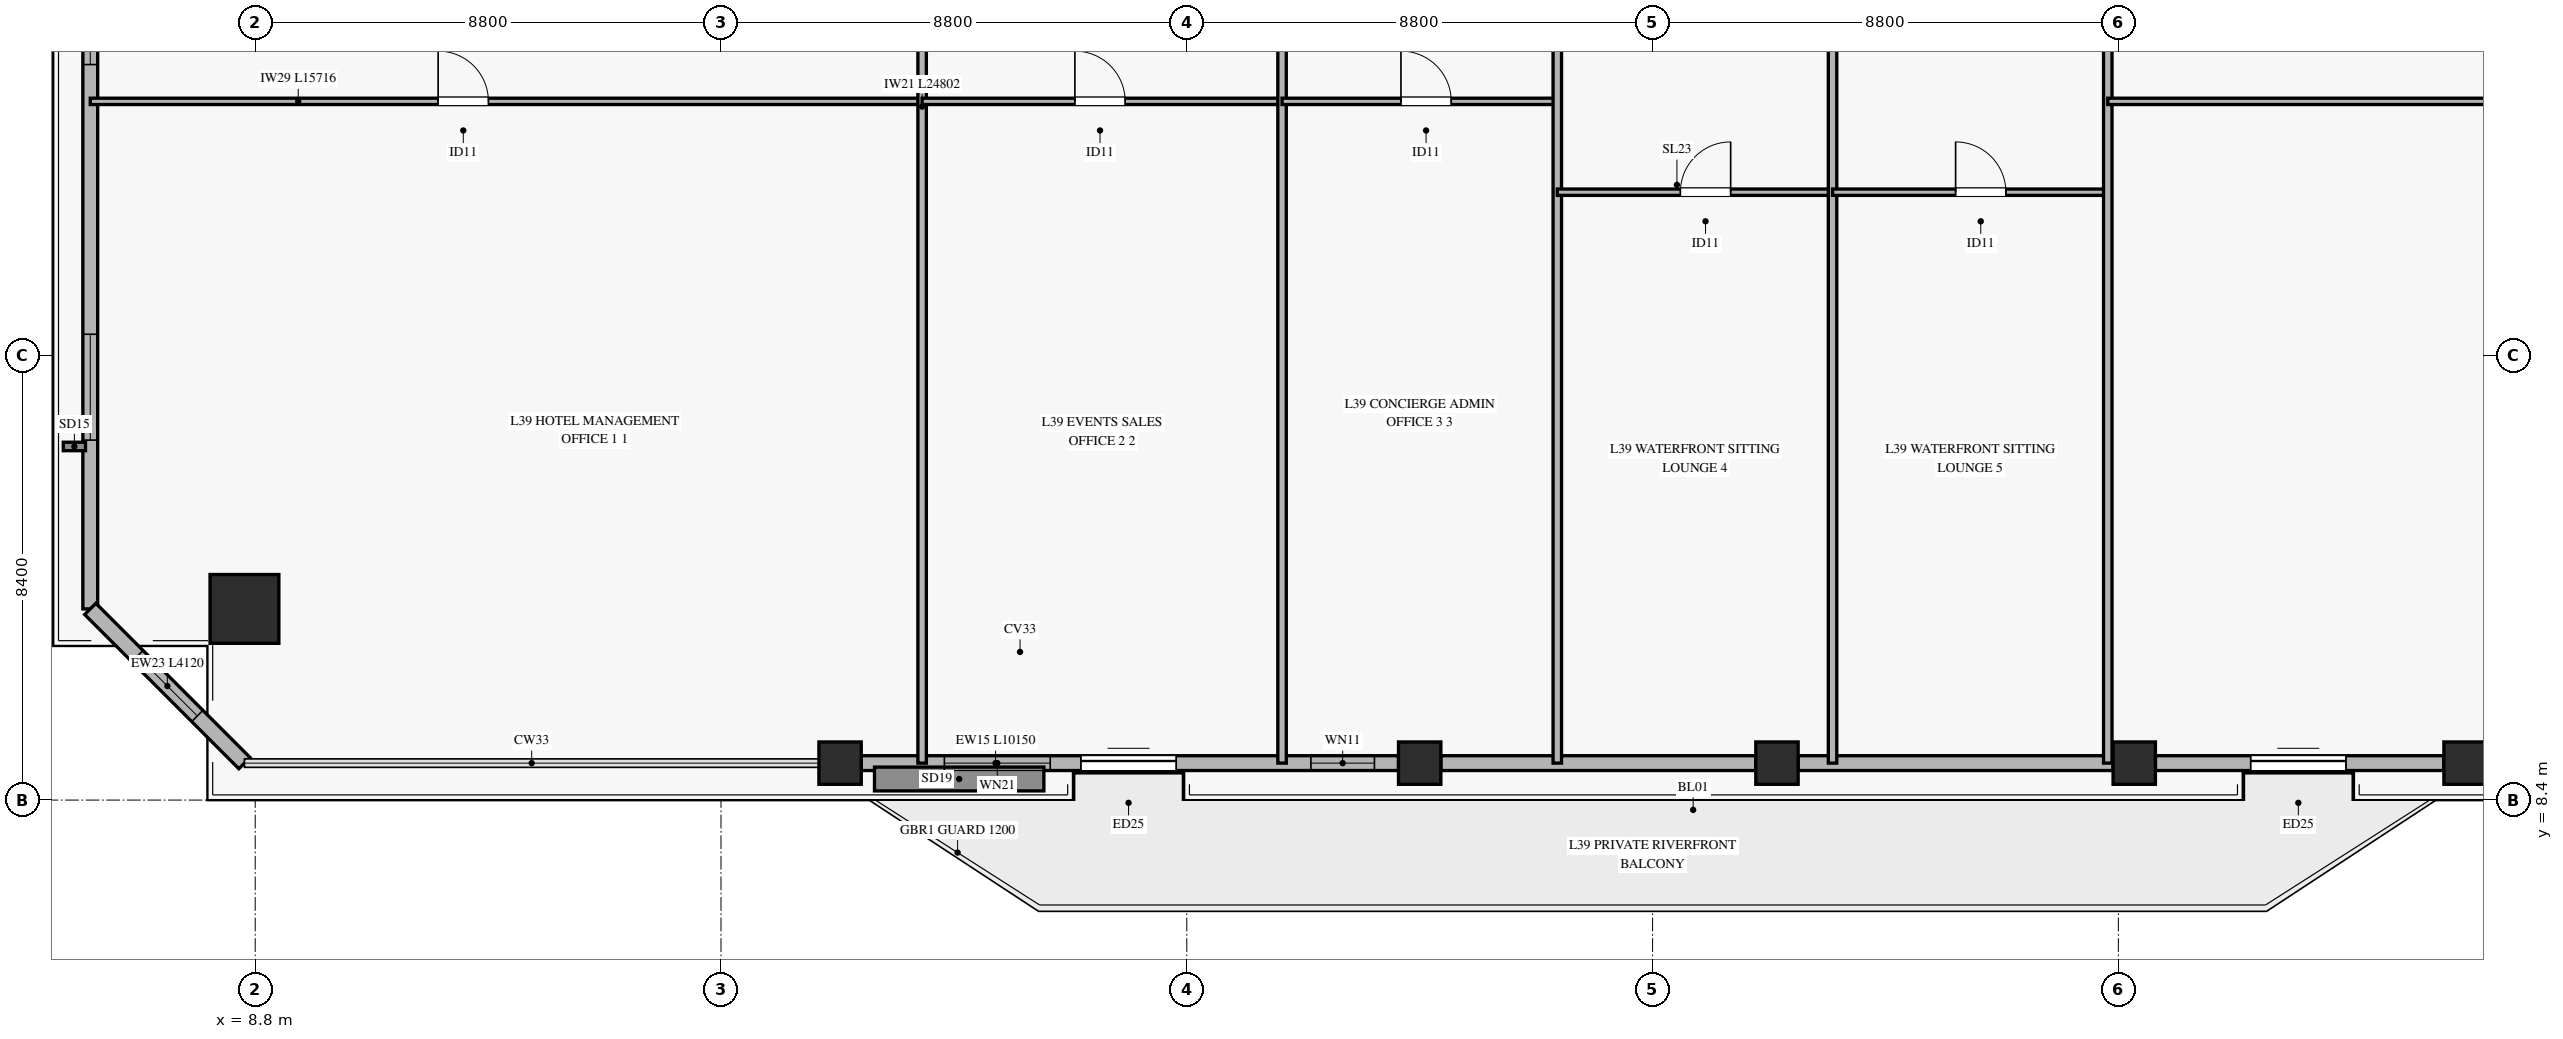
"""IFC4 building model, lengths in metres.
Left out: names, types, materials, properties, quantities, classifications, styles, units other than length and angle.
Written with IfcOpenShell. Run it as: python <this file> out.ifc"""

import sys

from ifc_helpers import new_model, si_unit, direction, frame, frame_2d, origin, origin_2d, place, context, subcontext, project, spatial, rectangle, hollow_rectangle, extrude, source, transform, mapped, element, fill, save


model = new_model("IFC4")
c1 = context("Model", 3, precision=1e-05, world=origin(), true_north=direction((0.0, 1.0)))
c2 = subcontext(c1, "Body", "Model", "MODEL_VIEW")
j1 = project(units=[si_unit("LENGTHUNIT", "METRE"), si_unit("PLANEANGLEUNIT", "RADIAN")], contexts=[c1])
p1 = place(None, origin())
s1 = spatial("IfcSite", under=j1, at=p1, CompositionType="ELEMENT")
p2 = place(p1, origin())
s2 = spatial("IfcBuilding", under=s1, at=p2, CompositionType="ELEMENT")
p3 = place(p2, frame((0.0, 0.0, 159.7)))
s3 = spatial("IfcBuildingStorey", under=s2, at=p3, CompositionType="ELEMENT", Elevation=159.7)
m1 = source(origin(), c2, "Body", "SweptSolid", [
    extrude(hollow_rectangle(XDim=1.3, YDim=1.3, WallThickness=0.06, at=origin_2d()), origin(), (0.0, 0.0, 1.0), 3.27),
])
p4 = place(p3, frame((8.597, 12.011, 0.0), z_axis=(0.0, 0.0, 1.0), x_axis=(1.0, 0.0, 0.0)))
e1 = element("IfcColumn", 1, at=p4, inside=s3, PredefinedType="COLUMN", context=c2, shape_type="MappedRepresentation", body=[
    mapped(m1, transform((0.0, 0.0, 0.0), x_axis=(1.0, 0.0, 0.0), y_axis=(0.0, 1.0, 0.0), z_axis=(0.0, 0.0, 1.0), scale=1.0)),
])
m2 = source(origin(), c2, "Body", "SweptSolid", [
    extrude(hollow_rectangle(XDim=0.8, YDim=0.8, WallThickness=0.036, at=origin_2d()), origin(), (0.0, 0.0, 1.0), 3.27),
])
for number, where, z_axis, x_axis in (
    (2, (19.85, 9.098, 0.0), (0.0, 0.0, 1.0), (1.0, 0.0, 0.0)),
    (3, (30.8, 9.098, 0.0), (0.0, 0.0, 1.0), (1.0, 0.0, 0.0)),
    (4, (37.55, 9.098, 0.0), (0.0, 0.0, 1.0), (1.0, 0.0, 0.0)),
    (5, (44.3, 9.098, 0.0), (0.0, 0.0, 1.0), (1.0, 0.0, 0.0)),
    (6, (50.55, 9.098, 0.0), (0.0, 0.0, 1.0), (1.0, 0.0, 0.0)),
):
    element("IfcColumn", number, at=place(p3, frame(where, z_axis=z_axis, x_axis=x_axis)), inside=s3, PredefinedType="COLUMN", context=c2, shape_type="MappedRepresentation", body=[
        mapped(m2, transform((0.0, 0.0, 0.0), x_axis=(1.0, 0.0, 0.0), y_axis=(0.0, 1.0, 0.0), z_axis=(0.0, 0.0, 1.0), scale=1.0)),
    ])
p5 = place(p3, frame((20.25, 9.098, 0.0), z_axis=(0.0, 0.0, 1.0), x_axis=(1.0, 0.0, 0.0)))
e7 = element("IfcWall", 7, at=p5, inside=s3, PredefinedType="SOLIDWALL", context=c2, shape_type="SweptSolid", body=[
    extrude(rectangle(XDim=10.15, YDim=0.28, at=frame_2d((5.075, 0.0))), origin(), (0.0, 0.0, 1.0), 2.75),
])
p6 = place(p5, frame((4.15, 0.0, 0.0)))
e8 = element("IfcOpeningElement", 8, at=p6, cuts=e7, PredefinedType="OPENING", context=c2, shape_type="SweptSolid", body=[
    extrude(rectangle(XDim=1.8, YDim=2.25, at=frame_2d((0.9, 1.125))), frame((0.0, 0.15, 0.0), z_axis=(0.0, -1.0, 0.0), x_axis=(1.0, 0.0, 0.0)), (0.0, 0.0, 1.0), 0.3),
])
p7 = place(p5, frame((1.57, 0.0, 0.45)))
e9 = element("IfcOpeningElement", 9, at=p7, cuts=e7, PredefinedType="OPENING", context=c2, shape_type="SweptSolid", body=[
    extrude(rectangle(XDim=2.0, YDim=2.0, at=frame_2d((1.0, 1.0))), frame((0.0, 0.15, 0.0), z_axis=(0.0, -1.0, 0.0), x_axis=(1.0, 0.0, 0.0)), (0.0, 0.0, 1.0), 0.3),
])
p8 = place(p5, frame((8.495, 0.0, 0.45)))
e10 = element("IfcOpeningElement", 10, at=p8, cuts=e7, PredefinedType="OPENING", context=c2, shape_type="SweptSolid", body=[
    extrude(rectangle(XDim=1.2, YDim=2.0, at=frame_2d((0.6, 1.0))), frame((0.0, 0.15, 0.0), z_axis=(0.0, -1.0, 0.0), x_axis=(1.0, 0.0, 0.0)), (0.0, 0.0, 1.0), 0.3),
])
for number, where, z_axis, x_axis in (
    (11, (31.2, 9.098, 0.0), (0.0, 0.0, 1.0), (1.0, 0.0, 0.0)),
    (12, (37.95, 9.098, 0.0), (0.0, 0.0, 1.0), (1.0, 0.0, 0.0)),
):
    element("IfcWall", number, at=place(p3, frame(where, z_axis=z_axis, x_axis=x_axis)), inside=s3, PredefinedType="SOLIDWALL", context=c2, shape_type="SweptSolid", body=[
        extrude(rectangle(XDim=5.95, YDim=0.28, at=frame_2d((2.975, 0.0))), origin(), (0.0, 0.0, 1.0), 2.75),
    ])
p9 = place(p3, frame((44.7, 9.098, 0.0), z_axis=(0.0, 0.0, 1.0), x_axis=(1.0, 0.0, 0.0)))
e13 = element("IfcWall", 13, at=p9, inside=s3, PredefinedType="SOLIDWALL", context=c2, shape_type="SweptSolid", body=[
    extrude(rectangle(XDim=5.45, YDim=0.28, at=frame_2d((2.725, 0.0))), origin(), (0.0, 0.0, 1.0), 2.75),
])
p10 = place(p9, frame((1.8, 0.0, 0.0)))
e14 = element("IfcOpeningElement", 14, at=p10, cuts=e13, PredefinedType="OPENING", context=c2, shape_type="SweptSolid", body=[
    extrude(rectangle(XDim=1.8, YDim=2.25, at=frame_2d((0.9, 1.125))), frame((0.0, 0.15, 0.0), z_axis=(0.0, -1.0, 0.0), x_axis=(1.0, 0.0, 0.0)), (0.0, 0.0, 1.0), 0.3),
])
p11 = place(p3, frame((5.684, 12.011, 0.0), z_axis=(0.0, 0.0, 1.0), x_axis=(0.0, 1.0, 0.0)))
e15 = element("IfcWall", 15, at=p11, inside=s3, PredefinedType="SOLIDWALL", context=c2, shape_type="SweptSolid", body=[
    extrude(rectangle(XDim=15.188, YDim=0.28, at=frame_2d((7.594, 0.0))), origin(), (0.0, 0.0, 1.0), 2.75),
])
p12 = place(p11, frame((3.189, 0.0, 0.45)))
e16 = element("IfcOpeningElement", 16, at=p12, cuts=e15, PredefinedType="OPENING", context=c2, shape_type="SweptSolid", body=[
    extrude(rectangle(XDim=2.0, YDim=2.0, at=frame_2d((1.0, 1.0))), frame((0.0, 0.15, 0.0), z_axis=(0.0, -1.0, 0.0), x_axis=(1.0, 0.0, 0.0)), (0.0, 0.0, 1.0), 0.3),
])
p13 = place(p11, frame((10.283, 0.0, 0.45)))
e17 = element("IfcOpeningElement", 17, at=p13, cuts=e15, PredefinedType="OPENING", context=c2, shape_type="SweptSolid", body=[
    extrude(rectangle(XDim=2.0, YDim=2.0, at=frame_2d((1.0, 1.0))), frame((0.0, 0.15, 0.0), z_axis=(0.0, -1.0, 0.0), x_axis=(1.0, 0.0, 0.0)), (0.0, 0.0, 1.0), 0.3),
])
p14 = place(p3, frame((5.684, 12.011, 0.0), z_axis=(0.0, 0.0, 1.0), x_axis=(0.707077148634, -0.707136412497, 0.0)))
e18 = element("IfcWall", 18, at=p14, inside=s3, PredefinedType="SOLIDWALL", context=c2, shape_type="SweptSolid", body=[
    extrude(rectangle(XDim=4.12, YDim=0.3, at=frame_2d((2.06, 0.0))), origin(), (0.0, 0.0, 1.0), 2.75),
])
p15 = place(p14, frame((1.26, 0.0, 0.45)))
e19 = element("IfcOpeningElement", 19, at=p15, cuts=e18, PredefinedType="OPENING", context=c2, shape_type="SweptSolid", body=[
    extrude(rectangle(XDim=1.6, YDim=2.0, at=frame_2d((0.8, 1.0))), frame((0.0, 0.16, 0.0), z_axis=(0.0, -1.0, 0.0), x_axis=(1.0, 0.0, 0.0)), (0.0, 0.0, 1.0), 0.32),
])
p16 = place(p3, frame((5.684, 21.599, 0.0), z_axis=(0.0, 0.0, 1.0), x_axis=(1.0, 0.0, 0.0)))
e20 = element("IfcWall", 20, at=p16, inside=s3, PredefinedType="PARTITIONING", context=c2, shape_type="SweptSolid", body=[
    extrude(rectangle(XDim=15.716, YDim=0.12, at=frame_2d((7.858, 0.0))), origin(), (0.0, 0.0, 1.0), 2.455),
])
p17 = place(p16, frame((6.572, 0.0, 0.0)))
e21 = element("IfcOpeningElement", 21, at=p17, cuts=e20, PredefinedType="OPENING", context=c2, shape_type="SweptSolid", body=[
    extrude(rectangle(XDim=0.95, YDim=2.1, at=frame_2d((0.475, 1.05))), frame((0.0, 0.07, 0.0), z_axis=(0.0, -1.0, 0.0), x_axis=(1.0, 0.0, 0.0)), (0.0, 0.0, 1.0), 0.14),
])
p18 = place(p3, frame((21.4, 9.098, 0.0), z_axis=(0.0, 0.0, 1.0), x_axis=(0.0, 1.0, 0.0)))
e22 = element("IfcWall", 22, at=p18, inside=s3, PredefinedType="PARTITIONING", context=c2, shape_type="SweptSolid", body=[
    extrude(rectangle(XDim=24.802, YDim=0.16, at=frame_2d((12.401, 0.0))), origin(), (0.0, 0.0, 1.0), 2.755),
])
p19 = place(p3, frame((21.4, 21.599, 0.0), z_axis=(0.0, 0.0, 1.0), x_axis=(1.0, 0.0, 0.0)))
e23 = element("IfcWall", 23, at=p19, inside=s3, PredefinedType="PARTITIONING", context=c2, shape_type="SweptSolid", body=[
    extrude(rectangle(XDim=6.8, YDim=0.12, at=frame_2d((3.4, 0.0))), origin(), (0.0, 0.0, 1.0), 3.27),
])
p20 = place(p19, frame((2.886, 0.0, 0.0)))
e24 = element("IfcOpeningElement", 24, at=p20, cuts=e23, PredefinedType="OPENING", context=c2, shape_type="SweptSolid", body=[
    extrude(rectangle(XDim=0.95, YDim=2.1, at=frame_2d((0.475, 1.05))), frame((0.0, 0.07, 0.0), z_axis=(0.0, -1.0, 0.0), x_axis=(1.0, 0.0, 0.0)), (0.0, 0.0, 1.0), 0.14),
])
p21 = place(p3, frame((28.2, 9.098, 0.0), z_axis=(0.0, 0.0, 1.0), x_axis=(0.0, 1.0, 0.0)))
e25 = element("IfcWall", 25, at=p21, inside=s3, PredefinedType="PARTITIONING", context=c2, shape_type="SweptSolid", body=[
    extrude(rectangle(XDim=24.802, YDim=0.16, at=frame_2d((12.401, 0.0))), origin(), (0.0, 0.0, 1.0), 2.755),
])
p22 = place(p3, frame((28.2, 21.599, 0.0), z_axis=(0.0, 0.0, 1.0), x_axis=(1.0, 0.0, 0.0)))
e26 = element("IfcWall", 26, at=p22, inside=s3, PredefinedType="PARTITIONING", context=c2, shape_type="SweptSolid", body=[
    extrude(rectangle(XDim=5.2, YDim=0.12, at=frame_2d((2.6, 0.0))), origin(), (0.0, 0.0, 1.0), 2.455),
])
p23 = place(p22, frame((2.246, 0.0, 0.0)))
e27 = element("IfcOpeningElement", 27, at=p23, cuts=e26, PredefinedType="OPENING", context=c2, shape_type="SweptSolid", body=[
    extrude(rectangle(XDim=0.95, YDim=2.1, at=frame_2d((0.475, 1.05))), frame((0.0, 0.07, 0.0), z_axis=(0.0, -1.0, 0.0), x_axis=(1.0, 0.0, 0.0)), (0.0, 0.0, 1.0), 0.14),
])
p24 = place(p3, frame((33.4, 9.098, 0.0), z_axis=(0.0, 0.0, 1.0), x_axis=(0.0, 1.0, 0.0)))
e28 = element("IfcWall", 28, at=p24, inside=s3, PredefinedType="PARTITIONING", context=c2, shape_type="SweptSolid", body=[
    extrude(rectangle(XDim=24.802, YDim=0.16, at=frame_2d((12.401, 0.0))), origin(), (0.0, 0.0, 1.0), 2.755),
])
p25 = place(p3, frame((33.4, 19.883, 0.0), z_axis=(0.0, 0.0, 1.0), x_axis=(1.0, 0.0, 0.0)))
e29 = element("IfcWall", 29, at=p25, inside=s3, PredefinedType="PARTITIONING", context=c2, shape_type="SweptSolid", body=[
    extrude(rectangle(XDim=5.2, YDim=0.12, at=frame_2d((2.6, 0.0))), origin(), (0.0, 0.0, 1.0), 2.455),
])
p26 = place(p25, frame((2.325, 0.0, 0.0)))
e30 = element("IfcOpeningElement", 30, at=p26, cuts=e29, PredefinedType="OPENING", context=c2, shape_type="SweptSolid", body=[
    extrude(rectangle(XDim=0.95, YDim=2.1, at=frame_2d((0.475, 1.05))), frame((0.0, 0.07, 0.0), z_axis=(0.0, -1.0, 0.0), x_axis=(1.0, 0.0, 0.0)), (0.0, 0.0, 1.0), 0.14),
])
p27 = place(p3, frame((38.6, 9.098, 0.0), z_axis=(0.0, 0.0, 1.0), x_axis=(0.0, 1.0, 0.0)))
e31 = element("IfcWall", 31, at=p27, inside=s3, PredefinedType="PARTITIONING", context=c2, shape_type="SweptSolid", body=[
    extrude(rectangle(XDim=24.802, YDim=0.16, at=frame_2d((12.401, 0.0))), origin(), (0.0, 0.0, 1.0), 2.755),
])
p28 = place(p3, frame((38.6, 19.883, 0.0), z_axis=(0.0, 0.0, 1.0), x_axis=(1.0, 0.0, 0.0)))
e32 = element("IfcWall", 32, at=p28, inside=s3, PredefinedType="PARTITIONING", context=c2, shape_type="SweptSolid", body=[
    extrude(rectangle(XDim=5.2, YDim=0.12, at=frame_2d((2.6, 0.0))), origin(), (0.0, 0.0, 1.0), 3.27),
])
p29 = place(p28, frame((2.325, 0.0, 0.0)))
e33 = element("IfcOpeningElement", 33, at=p29, cuts=e32, PredefinedType="OPENING", context=c2, shape_type="SweptSolid", body=[
    extrude(rectangle(XDim=0.95, YDim=2.1, at=frame_2d((0.475, 1.05))), frame((0.0, 0.07, 0.0), z_axis=(0.0, -1.0, 0.0), x_axis=(1.0, 0.0, 0.0)), (0.0, 0.0, 1.0), 0.14),
])
p30 = place(p3, frame((43.8, 9.098, 0.0), z_axis=(0.0, 0.0, 1.0), x_axis=(0.0, 1.0, 0.0)))
e34 = element("IfcWall", 34, at=p30, inside=s3, PredefinedType="PARTITIONING", context=c2, shape_type="SweptSolid", body=[
    extrude(rectangle(XDim=24.802, YDim=0.16, at=frame_2d((12.401, 0.0))), origin(), (0.0, 0.0, 1.0), 2.755),
])
p31 = place(p3, frame((43.8, 21.599, 0.0), z_axis=(0.0, 0.0, 1.0), x_axis=(1.0, 0.0, 0.0)))
e35 = element("IfcWall", 35, at=p31, inside=s3, PredefinedType="PARTITIONING", context=c2, shape_type="SweptSolid", body=[
    extrude(rectangle(XDim=20.916, YDim=0.12, at=frame_2d((10.458, 0.0))), origin(), (0.0, 0.0, 1.0), 2.455),
])
p32 = place(p31, frame((8.452, 0.0, 0.0)))
e36 = element("IfcOpeningElement", 36, at=p32, cuts=e35, PredefinedType="OPENING", context=c2, shape_type="SweptSolid", body=[
    extrude(rectangle(XDim=0.95, YDim=2.1, at=frame_2d((0.475, 1.05))), frame((0.0, 0.07, 0.0), z_axis=(0.0, -1.0, 0.0), x_axis=(1.0, 0.0, 0.0)), (0.0, 0.0, 1.0), 0.14),
])
m3 = source(origin(), c2, "Body", "SweptSolid", [
    extrude(rectangle(XDim=1.8, YDim=2.25, at=frame_2d((0.9, 1.125))), frame((0.0, 0.025, 0.0), z_axis=(0.0, -1.0, 0.0), x_axis=(1.0, 0.0, 0.0)), (0.0, 0.0, 1.0), 0.05),
])
p33 = place(p6, origin())
e37 = element("IfcDoor", 37, at=p33, inside=s3, OperationType="SLIDING_TO_LEFT", PredefinedType="DOOR", context=c2, shape_type="MappedRepresentation", body=[
    mapped(m3, transform((0.0, 0.0, 0.0), x_axis=(1.0, 0.0, 0.0), y_axis=(0.0, 1.0, 0.0), z_axis=(0.0, 0.0, 1.0), scale=1.0)),
])
fill(e8, e37)
m4 = source(origin(), c2, "Body", "SweptSolid", [
    extrude(rectangle(XDim=2.0, YDim=2.0, at=frame_2d((1.0, 1.0))), frame((0.0, 0.03, 0.0), z_axis=(0.0, -1.0, 0.0), x_axis=(1.0, 0.0, 0.0)), (0.0, 0.0, 1.0), 0.06),
])
p34 = place(p7, origin())
e38 = element("IfcWindow", 38, at=p34, inside=s3, PartitioningType="SINGLE_PANEL", PredefinedType="WINDOW", context=c2, shape_type="MappedRepresentation", body=[
    mapped(m4, transform((0.0, 0.0, 0.0), x_axis=(1.0, 0.0, 0.0), y_axis=(0.0, 1.0, 0.0), z_axis=(0.0, 0.0, 1.0), scale=1.0)),
])
fill(e9, e38)
m5 = source(origin(), c2, "Body", "SweptSolid", [
    extrude(rectangle(XDim=1.2, YDim=2.0, at=frame_2d((0.6, 1.0))), frame((0.0, 0.03, 0.0), z_axis=(0.0, -1.0, 0.0), x_axis=(1.0, 0.0, 0.0)), (0.0, 0.0, 1.0), 0.06),
])
p35 = place(p8, origin())
e39 = element("IfcWindow", 39, at=p35, inside=s3, PartitioningType="SINGLE_PANEL", PredefinedType="WINDOW", context=c2, shape_type="MappedRepresentation", body=[
    mapped(m5, transform((0.0, 0.0, 0.0), x_axis=(1.0, 0.0, 0.0), y_axis=(0.0, 1.0, 0.0), z_axis=(0.0, 0.0, 1.0), scale=1.0)),
])
fill(e10, e39)
p36 = place(p10, origin())
e40 = element("IfcDoor", 40, at=p36, inside=s3, OperationType="SLIDING_TO_LEFT", PredefinedType="DOOR", context=c2, shape_type="MappedRepresentation", body=[
    mapped(m3, transform((0.0, 0.0, 0.0), x_axis=(1.0, 0.0, 0.0), y_axis=(0.0, 1.0, 0.0), z_axis=(0.0, 0.0, 1.0), scale=1.0)),
])
fill(e14, e40)
p37 = place(p12, origin())
e41 = element("IfcWindow", 41, at=p37, inside=s3, PartitioningType="SINGLE_PANEL", PredefinedType="WINDOW", context=c2, shape_type="MappedRepresentation", body=[
    mapped(m4, transform((0.0, 0.0, 0.0), x_axis=(1.0, 0.0, 0.0), y_axis=(0.0, 1.0, 0.0), z_axis=(0.0, 0.0, 1.0), scale=1.0)),
])
fill(e16, e41)
p38 = place(p13, origin())
e42 = element("IfcWindow", 42, at=p38, inside=s3, PartitioningType="SINGLE_PANEL", PredefinedType="WINDOW", context=c2, shape_type="MappedRepresentation", body=[
    mapped(m4, transform((0.0, 0.0, 0.0), x_axis=(1.0, 0.0, 0.0), y_axis=(0.0, 1.0, 0.0), z_axis=(0.0, 0.0, 1.0), scale=1.0)),
])
fill(e17, e42)
m6 = source(origin(), c2, "Body", "SweptSolid", [
    extrude(rectangle(XDim=1.6, YDim=2.0, at=frame_2d((0.8, 1.0))), frame((0.0, 0.03, 0.0), z_axis=(0.0, -1.0, 0.0), x_axis=(1.0, 0.0, 0.0)), (0.0, 0.0, 1.0), 0.06),
])
p39 = place(p15, origin())
e43 = element("IfcWindow", 43, at=p39, inside=s3, PartitioningType="SINGLE_PANEL", PredefinedType="WINDOW", context=c2, shape_type="MappedRepresentation", body=[
    mapped(m6, transform((0.0, 0.0, 0.0), x_axis=(1.0, 0.0, 0.0), y_axis=(0.0, 1.0, 0.0), z_axis=(0.0, 0.0, 1.0), scale=1.0)),
])
fill(e19, e43)
m7 = source(origin(), c2, "Body", "SweptSolid", [
    extrude(rectangle(XDim=0.95, YDim=2.1, at=frame_2d((0.475, 1.05))), frame((0.0, 0.025, 0.0), z_axis=(0.0, -1.0, 0.0), x_axis=(1.0, 0.0, 0.0)), (0.0, 0.0, 1.0), 0.05),
])
p40 = place(p17, origin())
e44 = element("IfcDoor", 44, at=p40, inside=s3, OperationType="SINGLE_SWING_LEFT", PredefinedType="DOOR", context=c2, shape_type="MappedRepresentation", body=[
    mapped(m7, transform((0.0, 0.0, 0.0), x_axis=(1.0, 0.0, 0.0), y_axis=(0.0, 1.0, 0.0), z_axis=(0.0, 0.0, 1.0), scale=1.0)),
])
fill(e21, e44)
p41 = place(p20, origin())
e45 = element("IfcDoor", 45, at=p41, inside=s3, OperationType="SINGLE_SWING_LEFT", PredefinedType="DOOR", context=c2, shape_type="MappedRepresentation", body=[
    mapped(m7, transform((0.0, 0.0, 0.0), x_axis=(1.0, 0.0, 0.0), y_axis=(0.0, 1.0, 0.0), z_axis=(0.0, 0.0, 1.0), scale=1.0)),
])
fill(e24, e45)
p42 = place(p23, origin())
e46 = element("IfcDoor", 46, at=p42, inside=s3, OperationType="SINGLE_SWING_LEFT", PredefinedType="DOOR", context=c2, shape_type="MappedRepresentation", body=[
    mapped(m7, transform((0.0, 0.0, 0.0), x_axis=(1.0, 0.0, 0.0), y_axis=(0.0, 1.0, 0.0), z_axis=(0.0, 0.0, 1.0), scale=1.0)),
])
fill(e27, e46)
p43 = place(p26, origin())
e47 = element("IfcDoor", 47, at=p43, inside=s3, OperationType="SINGLE_SWING_RIGHT", PredefinedType="DOOR", context=c2, shape_type="MappedRepresentation", body=[
    mapped(m7, transform((0.0, 0.0, 0.0), x_axis=(1.0, 0.0, 0.0), y_axis=(0.0, 1.0, 0.0), z_axis=(0.0, 0.0, 1.0), scale=1.0)),
])
fill(e30, e47)
p44 = place(p29, origin())
e48 = element("IfcDoor", 48, at=p44, inside=s3, OperationType="SINGLE_SWING_LEFT", PredefinedType="DOOR", context=c2, shape_type="MappedRepresentation", body=[
    mapped(m7, transform((0.0, 0.0, 0.0), x_axis=(1.0, 0.0, 0.0), y_axis=(0.0, 1.0, 0.0), z_axis=(0.0, 0.0, 1.0), scale=1.0)),
])
fill(e33, e48)
save(model, sys.argv[1])
